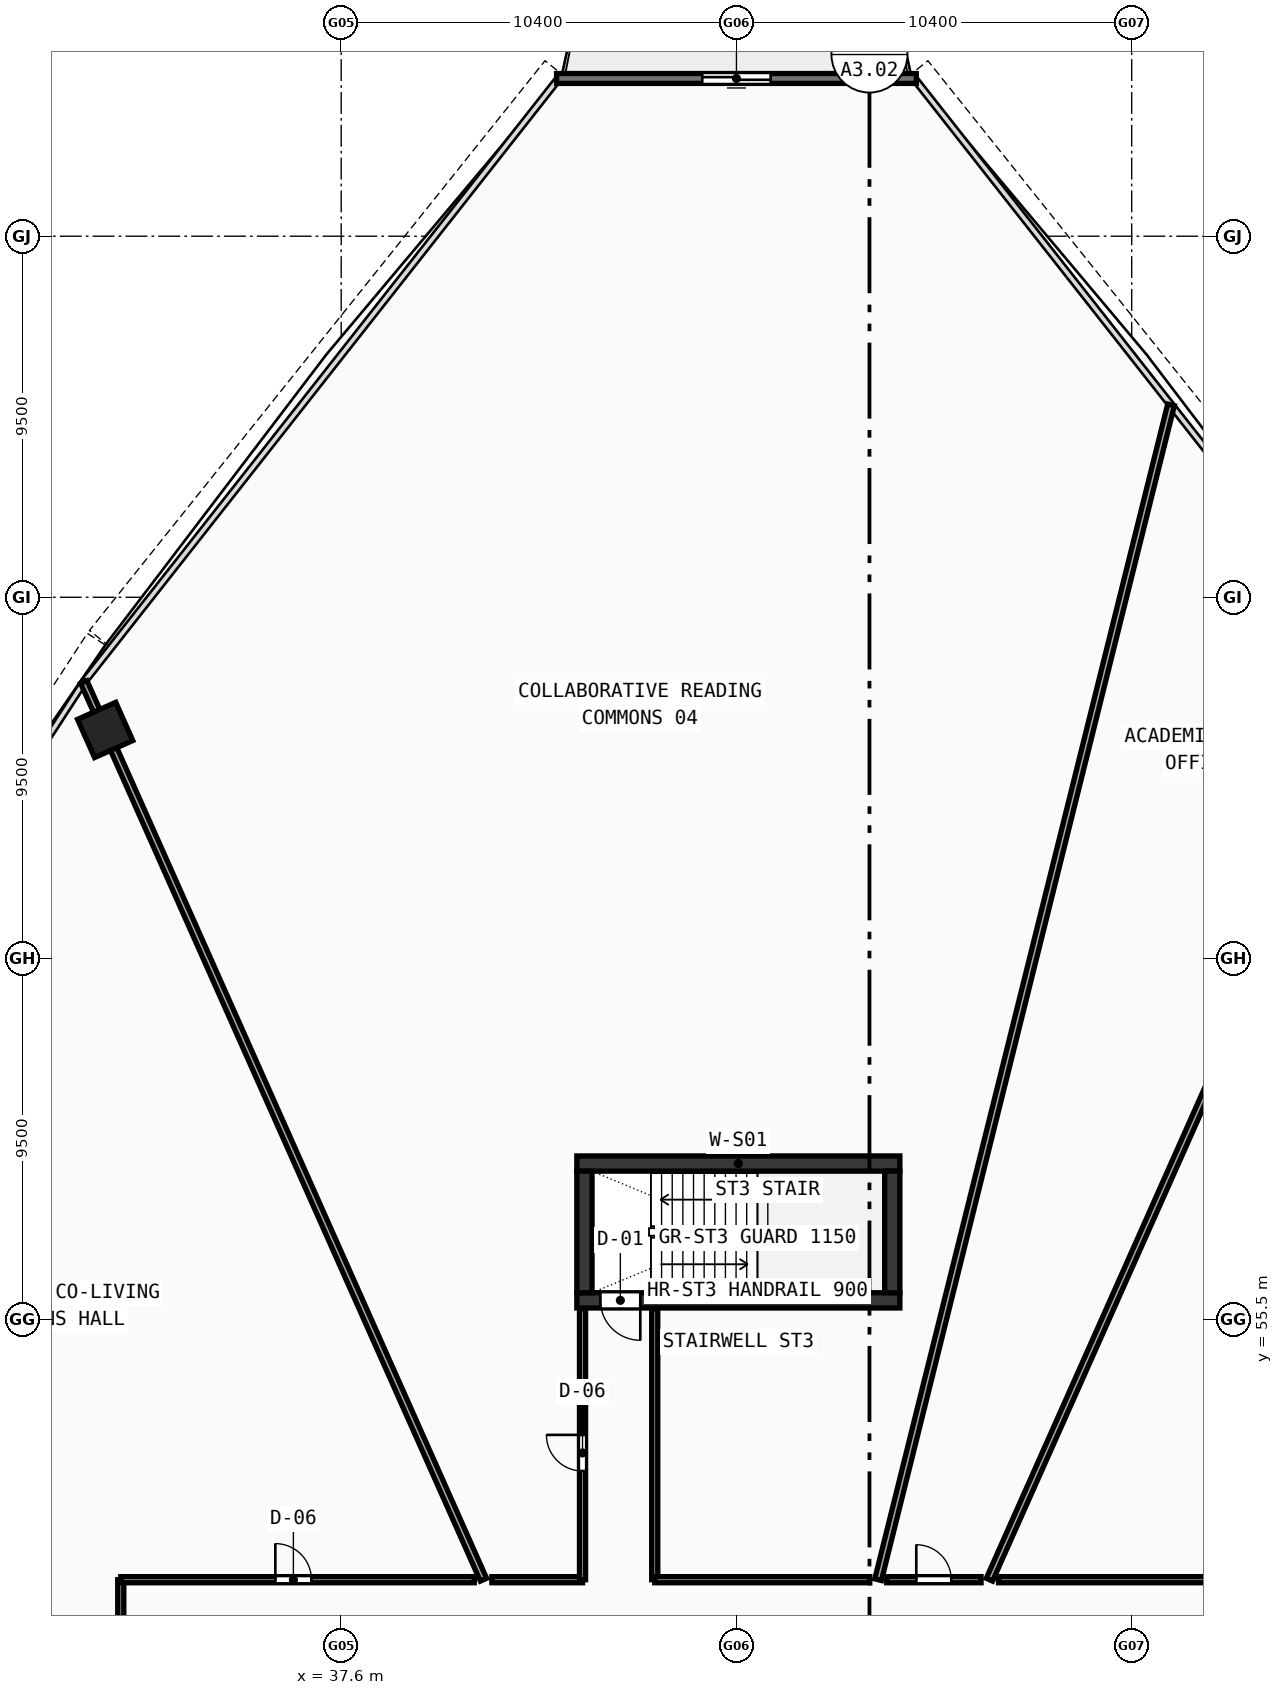
"""IFC4 building model, lengths in metres.
Left out: names, types, materials, properties, quantities, classifications, styles, units other than length and angle.
Written with IfcOpenShell. Run it as: python <this file> out.ifc"""

import sys

from ifc_helpers import new_model, si_unit, direction, frame, frame_2d, origin, origin_with_axes, origin_2d, place, context, subcontext, project, spatial, rectangle, hollow_rectangle, extrude, source, transform, mapped, element, fill, save


model = new_model("IFC4")
c1 = context("Model", 3, precision=1e-05, world=origin(), true_north=direction((0.0, 1.0)))
c2 = subcontext(c1, "Body", "Model", "MODEL_VIEW")
j1 = project(units=[si_unit("LENGTHUNIT", "METRE"), si_unit("PLANEANGLEUNIT", "RADIAN")], contexts=[c1])
p1 = place(None, origin())
s1 = spatial("IfcSite", under=j1, at=p1, CompositionType="ELEMENT")
p2 = place(p1, origin())
s2 = spatial("IfcBuilding", under=s1, at=p2, CompositionType="ELEMENT")
p3 = place(p2, frame((0.0, 0.0, 52.18)))
s3 = spatial("IfcBuildingStorey", under=s2, at=p3, CompositionType="ELEMENT", Elevation=52.18)
p4 = place(p3, frame((43.8, 59.6, 0.0), z_axis=(0.0, 0.0, 1.0), x_axis=(1.0, 0.0, 0.0)))
e1 = element("IfcWall", 1, at=p4, inside=s3, PredefinedType="SHEAR", context=c2, shape_type="SweptSolid", body=[
    extrude(rectangle(XDim=8.5, YDim=0.4, at=frame_2d((4.25, 0.0))), origin(), (0.0, 0.0, 1.0), 3.37),
])
p5 = place(p3, frame((43.8, 56.0, 0.0), z_axis=(0.0, 0.0, 1.0), x_axis=(1.0, 0.0, 0.0)))
e2 = element("IfcWall", 2, at=p5, inside=s3, PredefinedType="SHEAR", context=c2, shape_type="SweptSolid", body=[
    extrude(rectangle(XDim=8.5, YDim=0.4, at=frame_2d((4.25, 0.0))), origin(), (0.0, 0.0, 1.0), 3.37),
])
p6 = place(p5, frame((0.62, 0.0, 0.0)))
e3 = element("IfcOpeningElement", 3, at=p6, cuts=e2, PredefinedType="OPENING", context=c2, shape_type="SweptSolid", body=[
    extrude(rectangle(XDim=1.05, YDim=2.1, at=frame_2d((0.525, 1.05))), frame((0.0, 0.21, 0.0), z_axis=(0.0, -1.0, 0.0), x_axis=(1.0, 0.0, 0.0)), (0.0, 0.0, 1.0), 0.42),
])
for number, where, z_axis, x_axis in (
    (4, (44.0, 56.2, 0.0), (0.0, 0.0, 1.0), (0.0, 1.0, 0.0)),
    (5, (52.1, 56.2, 0.0), (0.0, 0.0, 1.0), (0.0, 1.0, 0.0)),
):
    element("IfcWall", number, at=place(p3, frame(where, z_axis=z_axis, x_axis=x_axis)), inside=s3, PredefinedType="SHEAR", context=c2, shape_type="SweptSolid", body=[
        extrude(rectangle(XDim=3.2, YDim=0.4, at=frame_2d((1.6, 0.0))), origin(), (0.0, 0.0, 1.0), 3.37),
    ])
m1 = source(origin(), c2, "Body", "SweptSolid", [
    extrude(hollow_rectangle(XDim=1.1, YDim=1.1, WallThickness=0.045, at=origin_2d()), origin(), (0.0, 0.0, 1.0), 3.63),
])
p7 = place(p3, frame((31.389, 71.009, -0.26), z_axis=(0.0, 0.0, 1.0), x_axis=(-0.913545457643, -0.406736643076, 0.0)))
e6 = element("IfcColumn", 6, at=p7, inside=s3, PredefinedType="COLUMN", context=c2, shape_type="MappedRepresentation", body=[
    mapped(m1, transform((0.0, 0.0, 0.0), scale=1.0)),
])
p8 = place(p3, frame((52.733, 88.15, 0.0), z_axis=(0.0, 0.0, 1.0), x_axis=(-1.0, 0.0, 0.0)))
e7 = element("IfcWall", 7, at=p8, inside=s3, PredefinedType="STANDARD", context=c2, shape_type="SweptSolid", body=[
    extrude(rectangle(XDim=9.466, YDim=0.26, at=frame_2d((4.733, 0.0))), origin(), (0.0, 0.0, 1.0), 3.37),
])
p9 = place(p8, frame((3.833, 0.0, 0.0)))
e8 = element("IfcOpeningElement", 8, at=p9, cuts=e7, PredefinedType="OPENING", context=c2, shape_type="SweptSolid", body=[
    extrude(rectangle(XDim=1.8, YDim=2.15, at=frame_2d((0.9, 1.075))), frame((0.0, 0.14, 0.0), z_axis=(0.0, -1.0, 0.0), x_axis=(1.0, 0.0, 0.0)), (0.0, 0.0, 1.0), 0.28),
])
p10 = place(p3, frame((54.656, 48.65, 0.0), z_axis=(0.0, 0.0, 1.0), x_axis=(0.406729800422, 0.913548504158, 0.0)))
e9 = element("IfcWall", 9, at=p10, inside=s3, PredefinedType="PARTITIONING", context=c2, shape_type="SweptSolid", body=[
    extrude(rectangle(XDim=25.854, YDim=0.18, at=frame_2d((12.927, 0.0))), origin(), (0.0, 0.0, 1.0), 2.67),
])
p11 = place(p3, frame((51.728, 48.65, 0.0), z_axis=(0.0, 0.0, 1.0), x_axis=(0.241918895985, 0.970296474159, 0.0)))
e10 = element("IfcWall", 10, at=p11, inside=s3, PredefinedType="PARTITIONING", context=c2, shape_type="SweptSolid", body=[
    extrude(rectangle(XDim=31.858, YDim=0.18, at=frame_2d((15.929, 0.0))), origin(), (0.0, 0.0, 1.0), 2.67),
])
p12 = place(p3, frame((41.344, 48.65, 0.0), z_axis=(0.0, 0.0, 1.0), x_axis=(-0.406729800422, 0.913548504158, 0.0)))
e11 = element("IfcWall", 11, at=p12, inside=s3, PredefinedType="PARTITIONING", context=c2, shape_type="SweptSolid", body=[
    extrude(rectangle(XDim=25.854, YDim=0.18, at=frame_2d((12.927, 0.0))), origin(), (0.0, 0.0, 1.0), 2.67),
])
p13 = place(p3, frame((31.8, 41.601, 0.0), z_axis=(0.0, 0.0, 1.0), x_axis=(-0.898795978277, 0.438367185625, 0.0)))
e12 = element("IfcWall", 12, at=p13, inside=s3, PredefinedType="PARTITIONING", context=c2, shape_type="SweptSolid", body=[
    extrude(rectangle(XDim=16.788, YDim=0.18, at=frame_2d((8.394, 0.0))), origin(), (0.0, 0.0, 1.0), 2.67),
])
p14 = place(p3, frame((31.8, 41.846, 0.0), z_axis=(0.0, 0.0, 1.0), x_axis=(0.0, 1.0, 0.0)))
e13 = element("IfcWall", 13, at=p14, inside=s3, PredefinedType="PARTITIONING", context=c2, shape_type="SweptSolid", body=[
    extrude(rectangle(XDim=6.804, YDim=0.16, at=frame_2d((3.402, 0.0))), origin(), (0.0, 0.0, 1.0), 2.67),
])
p15 = place(p3, frame((31.8, 48.65, 0.0), z_axis=(0.0, 0.0, 1.0), x_axis=(1.0, 0.0, 0.0)))
e14 = element("IfcWall", 14, at=p15, inside=s3, PredefinedType="PARTITIONING", context=c2, shape_type="SweptSolid", body=[
    extrude(rectangle(XDim=9.303, YDim=0.16, at=frame_2d((4.651, 0.0))), origin(), (0.0, 0.0, 1.0), 2.97),
])
p16 = place(p15, frame((4.067, 0.0, 0.0)))
e15 = element("IfcOpeningElement", 15, at=p16, cuts=e14, PredefinedType="OPENING", context=c2, shape_type="SweptSolid", body=[
    extrude(rectangle(XDim=0.95, YDim=2.1, at=frame_2d((0.475, 1.05))), frame((0.0, 0.09, 0.0), z_axis=(0.0, -1.0, 0.0), x_axis=(1.0, 0.0, 0.0)), (0.0, 0.0, 1.0), 0.18),
])
p17 = place(p3, frame((41.564, 48.65, 0.0), z_axis=(0.0, 0.0, 1.0), x_axis=(1.0, 0.0, 0.0)))
e16 = element("IfcWall", 16, at=p17, inside=s3, PredefinedType="PARTITIONING", context=c2, shape_type="SweptSolid", body=[
    extrude(rectangle(XDim=2.386, YDim=0.16, at=frame_2d((1.193, 0.0))), origin(), (0.0, 0.0, 1.0), 2.67),
])
p18 = place(p3, frame((43.95, 48.65, 0.0), z_axis=(0.0, 0.0, 1.0), x_axis=(0.0, 1.0, 0.0)))
e17 = element("IfcWall", 17, at=p18, inside=s3, PredefinedType="PARTITIONING", context=c2, shape_type="SweptSolid", body=[
    extrude(rectangle(XDim=7.13, YDim=0.16, at=frame_2d((3.565, 0.0))), origin(), (0.0, 0.0, 1.0), 2.97),
])
p19 = place(p18, frame((2.86, 0.0, 0.0)))
e18 = element("IfcOpeningElement", 18, at=p19, cuts=e17, PredefinedType="OPENING", context=c2, shape_type="SweptSolid", body=[
    extrude(rectangle(XDim=0.95, YDim=2.1, at=frame_2d((0.475, 1.05))), frame((0.0, 0.09, 0.0), z_axis=(0.0, -1.0, 0.0), x_axis=(1.0, 0.0, 0.0)), (0.0, 0.0, 1.0), 0.18),
])
p20 = place(p3, frame((45.85, 55.78, 0.0), z_axis=(0.0, 0.0, 1.0), x_axis=(0.0, -1.0, 0.0)))
e19 = element("IfcWall", 19, at=p20, inside=s3, PredefinedType="PARTITIONING", context=c2, shape_type="SweptSolid", body=[
    extrude(rectangle(XDim=7.13, YDim=0.16, at=frame_2d((3.565, 0.0))), origin(), (0.0, 0.0, 1.0), 2.97),
])
p21 = place(p3, frame((45.85, 48.65, 0.0), z_axis=(0.0, 0.0, 1.0), x_axis=(1.0, 0.0, 0.0)))
e20 = element("IfcWall", 20, at=p21, inside=s3, PredefinedType="PARTITIONING", context=c2, shape_type="SweptSolid", body=[
    extrude(rectangle(XDim=5.658, YDim=0.16, at=frame_2d((2.829, 0.0))), origin(), (0.0, 0.0, 1.0), 3.37),
])
p22 = place(p3, frame((51.954, 48.65, 0.0), z_axis=(0.0, 0.0, 1.0), x_axis=(1.0, 0.0, 0.0)))
e21 = element("IfcWall", 21, at=p22, inside=s3, PredefinedType="PARTITIONING", context=c2, shape_type="SweptSolid", body=[
    extrude(rectangle(XDim=2.482, YDim=0.16, at=frame_2d((1.241, 0.0))), origin(), (0.0, 0.0, 1.0), 2.67),
])
p23 = place(p22, frame((0.778, 0.0, 0.0)))
e22 = element("IfcOpeningElement", 22, at=p23, cuts=e21, PredefinedType="OPENING", context=c2, shape_type="SweptSolid", body=[
    extrude(rectangle(XDim=0.92, YDim=2.1, at=frame_2d((0.46, 1.05))), frame((0.0, 0.09, 0.0), z_axis=(0.0, -1.0, 0.0), x_axis=(1.0, 0.0, 0.0)), (0.0, 0.0, 1.0), 0.18),
])
p24 = place(p3, frame((54.897, 48.65, 0.0), z_axis=(0.0, 0.0, 1.0), x_axis=(1.0, 0.0, 0.0)))
e23 = element("IfcWall", 23, at=p24, inside=s3, PredefinedType="PARTITIONING", context=c2, shape_type="SweptSolid", body=[
    extrude(rectangle(XDim=8.003, YDim=0.16, at=frame_2d((4.001, 0.0))), origin(), (0.0, 0.0, 1.0), 2.97),
])
m2 = source(origin(), c2, "Body", "SweptSolid", [
    extrude(rectangle(XDim=1.8, YDim=2.15, at=frame_2d((0.9, 1.075))), frame((0.0, 0.025, 0.0), z_axis=(0.0, -1.0, 0.0), x_axis=(1.0, 0.0, 0.0)), (0.0, 0.0, 1.0), 0.05),
])
p25 = place(p9, origin_with_axes())
e24 = element("IfcDoor", 24, at=p25, inside=s3, OperationType="DOUBLE_DOOR_SLIDING", PredefinedType="DOOR", context=c2, shape_type="MappedRepresentation", body=[
    mapped(m2, transform((0.0, 0.0, 0.0), scale=1.0)),
])
fill(e8, e24)
m3 = source(origin(), c2, "Body", "SweptSolid", [
    extrude(rectangle(XDim=1.05, YDim=2.1, at=frame_2d((0.525, 1.05))), frame((0.0, 0.025, 0.0), z_axis=(0.0, -1.0, 0.0), x_axis=(1.0, 0.0, 0.0)), (0.0, 0.0, 1.0), 0.05),
])
p26 = place(p6, frame((1.05, 0.0, 0.0), z_axis=(0.0, 0.0, 1.0), x_axis=(-1.0, 0.0, 0.0)))
e25 = element("IfcDoor", 25, at=p26, inside=s3, OperationType="SINGLE_SWING_LEFT", PredefinedType="DOOR", context=c2, shape_type="MappedRepresentation", body=[
    mapped(m3, transform((0.0, 0.0, 0.0), scale=1.0)),
])
fill(e3, e25)
m4 = source(origin(), c2, "Body", "SweptSolid", [
    extrude(rectangle(XDim=0.92, YDim=2.1, at=frame_2d((0.46, 1.05))), frame((0.0, 0.025, 0.0), z_axis=(0.0, -1.0, 0.0), x_axis=(1.0, 0.0, 0.0)), (0.0, 0.0, 1.0), 0.05),
])
p27 = place(p23, origin_with_axes())
e26 = element("IfcDoor", 26, at=p27, inside=s3, OperationType="SINGLE_SWING_LEFT", PredefinedType="DOOR", context=c2, shape_type="MappedRepresentation", body=[
    mapped(m4, transform((0.0, 0.0, 0.0), scale=1.0)),
])
fill(e22, e26)
m5 = source(origin(), c2, "Body", "SweptSolid", [
    extrude(rectangle(XDim=0.95, YDim=2.1, at=frame_2d((0.475, 1.05))), frame((0.0, 0.025, 0.0), z_axis=(0.0, -1.0, 0.0), x_axis=(1.0, 0.0, 0.0)), (0.0, 0.0, 1.0), 0.05),
])
p28 = place(p19, origin_with_axes())
e27 = element("IfcDoor", 27, at=p28, inside=s3, OperationType="SINGLE_SWING_RIGHT", PredefinedType="DOOR", context=c2, shape_type="MappedRepresentation", body=[
    mapped(m5, transform((0.0, 0.0, 0.0), scale=1.0)),
])
fill(e18, e27)
p29 = place(p16, origin_with_axes())
e28 = element("IfcDoor", 28, at=p29, inside=s3, OperationType="SINGLE_SWING_LEFT", PredefinedType="DOOR", context=c2, shape_type="MappedRepresentation", body=[
    mapped(m5, transform((0.0, 0.0, 0.0), scale=1.0)),
])
fill(e15, e28)
save(model, sys.argv[1])
